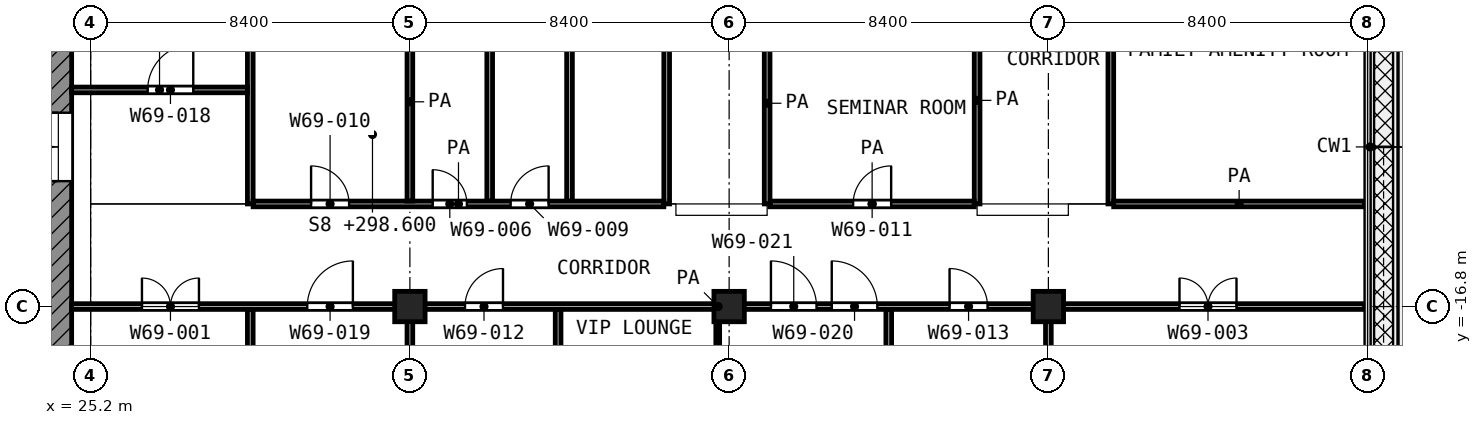
"""IFC4 building model, lengths in metres.
Left out: names, types, materials, properties, quantities, classifications, styles, units other than length and angle.
Written with IfcOpenShell. Run it as: python <this file> out.ifc"""

import sys

from ifc_helpers import new_model, si_unit, direction, frame, frame_2d, origin, origin_2d, place, context, subcontext, project, spatial, rectangle, extrude, element, fill, save


model = new_model("IFC4")
c1 = context("Model", 3, precision=1e-05, world=origin(), true_north=direction((0.0, 1.0)))
c2 = subcontext(c1, "Body", "Model", "MODEL_VIEW")
j1 = project(units=[si_unit("LENGTHUNIT", "METRE"), si_unit("PLANEANGLEUNIT", "RADIAN")], contexts=[c1])
p1 = place(None, origin())
s1 = spatial("IfcSite", under=j1, at=p1, CompositionType="ELEMENT")
p2 = place(p1, origin())
s2 = spatial("IfcBuilding", under=s1, at=p2, CompositionType="ELEMENT")
p3 = place(p2, frame((0.0, 0.0, 298.6)))
s3 = spatial("IfcBuildingStorey", under=s2, at=p3, CompositionType="ELEMENT", Elevation=298.6)
for number, where, z_axis, x_axis in (
    (1, (33.6, -16.8, 0.0), (0.0, 0.0, 1.0), (1.0, 0.0, 0.0)),
    (2, (42.0, -16.8, 0.0), (0.0, 0.0, 1.0), (1.0, 0.0, 0.0)),
    (3, (50.4, -16.8, 0.0), (0.0, 0.0, 1.0), (1.0, 0.0, 0.0)),
):
    element("IfcColumn", number, at=place(p3, frame(where, z_axis=z_axis, x_axis=x_axis)), inside=s3, PredefinedType="COLUMN", context=c2, shape_type="SweptSolid", body=[
        extrude(rectangle(XDim=0.8, YDim=0.8, at=origin_2d()), origin(), (0.0, 0.0, 1.0), 4.2),
    ])
p4 = place(p3, frame((24.35, -24.0, 0.0), z_axis=(0.0, 0.0, 1.0), x_axis=(0.0, 1.0, 0.0)))
e4 = element("IfcWall", 4, at=p4, inside=s3, PredefinedType="SHEAR", context=c2, shape_type="SweptSolid", body=[
    extrude(rectangle(XDim=18.6, YDim=0.7, at=frame_2d((9.3, 0.0))), origin(), (0.0, 0.0, 1.0), 3.6),
])
p5 = place(p4, frame((10.5, 0.0, 0.0)))
e5 = element("IfcOpeningElement", 5, at=p5, cuts=e4, PredefinedType="OPENING", context=c2, shape_type="SweptSolid", body=[
    extrude(rectangle(XDim=1.8, YDim=2.1, at=frame_2d((0.9, 1.05))), frame((0.0, 0.36, 0.0), z_axis=(0.0, -1.0, 0.0), x_axis=(1.0, 0.0, 0.0)), (0.0, 0.0, 1.0), 0.72),
])
p6 = place(p3, frame((41.7, -20.35, 0.0), z_axis=(0.0, 0.0, 1.0), x_axis=(0.0, 1.0, 0.0)))
e6 = element("IfcWall", 6, at=p6, inside=s3, PredefinedType="PARTITIONING", context=c2, shape_type="SweptSolid", body=[
    extrude(rectangle(XDim=3.475, YDim=0.1, at=frame_2d((1.738, 0.0))), origin(), (0.0, 0.0, 1.0), 3.6),
])
p7 = place(p6, frame((1.25, 0.0, 0.0)))
e7 = element("IfcOpeningElement", 7, at=p7, cuts=e6, PredefinedType="OPENING", context=c2, shape_type="SweptSolid", body=[
    extrude(rectangle(XDim=1.0, YDim=2.1, at=frame_2d((0.5, 1.05))), frame((0.0, 0.06, 0.0), z_axis=(0.0, -1.0, 0.0), x_axis=(1.0, 0.0, 0.0)), (0.0, 0.0, 1.0), 0.12),
])
p8 = place(p3, frame((24.7, -16.8, 0.0), z_axis=(0.0, 0.0, 1.0), x_axis=(1.0, 0.0, 0.0)))
e8 = element("IfcWall", 8, at=p8, inside=s3, PredefinedType="PARTITIONING", context=c2, shape_type="SweptSolid", body=[
    extrude(rectangle(XDim=34.02, YDim=0.15, at=frame_2d((17.01, 0.0))), origin(), (0.0, 0.0, 1.0), 3.6),
])
p9 = place(p8, frame((1.85, 0.0, 0.0)))
e9 = element("IfcOpeningElement", 9, at=p9, cuts=e8, PredefinedType="OPENING", context=c2, shape_type="SweptSolid", body=[
    extrude(rectangle(XDim=1.5, YDim=2.1, at=frame_2d((0.75, 1.05))), frame((0.0, 0.085, 0.0), z_axis=(0.0, -1.0, 0.0), x_axis=(1.0, 0.0, 0.0)), (0.0, 0.0, 1.0), 0.17),
])
p10 = place(p8, frame((6.2, 0.0, 0.0)))
e10 = element("IfcOpeningElement", 10, at=p10, cuts=e8, PredefinedType="OPENING", context=c2, shape_type="SweptSolid", body=[
    extrude(rectangle(XDim=1.2, YDim=2.1, at=frame_2d((0.6, 1.05))), frame((0.0, 0.085, 0.0), z_axis=(0.0, -1.0, 0.0), x_axis=(1.0, 0.0, 0.0)), (0.0, 0.0, 1.0), 0.17),
])
p11 = place(p8, frame((10.35, 0.0, 0.0)))
e11 = element("IfcOpeningElement", 11, at=p11, cuts=e8, PredefinedType="OPENING", context=c2, shape_type="SweptSolid", body=[
    extrude(rectangle(XDim=1.0, YDim=2.1, at=frame_2d((0.5, 1.05))), frame((0.0, 0.085, 0.0), z_axis=(0.0, -1.0, 0.0), x_axis=(1.0, 0.0, 0.0)), (0.0, 0.0, 1.0), 0.17),
])
p12 = place(p8, frame((20.0, 0.0, 0.0)))
e12 = element("IfcOpeningElement", 12, at=p12, cuts=e8, PredefinedType="OPENING", context=c2, shape_type="SweptSolid", body=[
    extrude(rectangle(XDim=1.2, YDim=2.1, at=frame_2d((0.6, 1.05))), frame((0.0, 0.085, 0.0), z_axis=(0.0, -1.0, 0.0), x_axis=(1.0, 0.0, 0.0)), (0.0, 0.0, 1.0), 0.17),
])
p13 = place(p8, frame((18.4, 0.0, 0.0)))
e13 = element("IfcOpeningElement", 13, at=p13, cuts=e8, PredefinedType="OPENING", context=c2, shape_type="SweptSolid", body=[
    extrude(rectangle(XDim=1.2, YDim=2.1, at=frame_2d((0.6, 1.05))), frame((0.0, 0.085, 0.0), z_axis=(0.0, -1.0, 0.0), x_axis=(1.0, 0.0, 0.0)), (0.0, 0.0, 1.0), 0.17),
])
p14 = place(p8, frame((23.1, 0.0, 0.0)))
e14 = element("IfcOpeningElement", 14, at=p14, cuts=e8, PredefinedType="OPENING", context=c2, shape_type="SweptSolid", body=[
    extrude(rectangle(XDim=1.0, YDim=2.1, at=frame_2d((0.5, 1.05))), frame((0.0, 0.085, 0.0), z_axis=(0.0, -1.0, 0.0), x_axis=(1.0, 0.0, 0.0)), (0.0, 0.0, 1.0), 0.17),
])
p15 = place(p8, frame((29.15, 0.0, 0.0)))
e15 = element("IfcOpeningElement", 15, at=p15, cuts=e8, PredefinedType="OPENING", context=c2, shape_type="SweptSolid", body=[
    extrude(rectangle(XDim=1.5, YDim=2.1, at=frame_2d((0.75, 1.05))), frame((0.0, 0.085, 0.0), z_axis=(0.0, -1.0, 0.0), x_axis=(1.0, 0.0, 0.0)), (0.0, 0.0, 1.0), 0.17),
])
p16 = place(p3, frame((29.475, -14.1, 0.0), z_axis=(0.0, 0.0, 1.0), x_axis=(1.0, 0.0, 0.0)))
e16 = element("IfcWall", 16, at=p16, inside=s3, PredefinedType="PARTITIONING", context=c2, shape_type="SweptSolid", body=[
    extrude(rectangle(XDim=10.807, YDim=0.15, at=frame_2d((5.403, 0.0))), origin(), (0.0, 0.0, 1.0), 3.6),
])
p17 = place(p16, frame((1.525, 0.0, 0.0)))
e17 = element("IfcOpeningElement", 17, at=p17, cuts=e16, PredefinedType="OPENING", context=c2, shape_type="SweptSolid", body=[
    extrude(rectangle(XDim=1.0, YDim=2.1, at=frame_2d((0.5, 1.05))), frame((0.0, 0.085, 0.0), z_axis=(0.0, -1.0, 0.0), x_axis=(1.0, 0.0, 0.0)), (0.0, 0.0, 1.0), 0.17),
])
p18 = place(p16, frame((4.725, 0.0, 0.0)))
e18 = element("IfcOpeningElement", 18, at=p18, cuts=e16, PredefinedType="OPENING", context=c2, shape_type="SweptSolid", body=[
    extrude(rectangle(XDim=0.9, YDim=2.1, at=frame_2d((0.45, 1.05))), frame((0.0, 0.085, 0.0), z_axis=(0.0, -1.0, 0.0), x_axis=(1.0, 0.0, 0.0)), (0.0, 0.0, 1.0), 0.17),
])
p19 = place(p16, frame((6.775, 0.0, 0.0)))
e19 = element("IfcOpeningElement", 19, at=p19, cuts=e16, PredefinedType="OPENING", context=c2, shape_type="SweptSolid", body=[
    extrude(rectangle(XDim=1.0, YDim=2.1, at=frame_2d((0.5, 1.05))), frame((0.0, 0.085, 0.0), z_axis=(0.0, -1.0, 0.0), x_axis=(1.0, 0.0, 0.0)), (0.0, 0.0, 1.0), 0.17),
])
p20 = place(p3, frame((43.075, -14.1, 0.0), z_axis=(0.0, 0.0, 1.0), x_axis=(1.0, 0.0, 0.0)))
e20 = element("IfcWall", 20, at=p20, inside=s3, PredefinedType="PARTITIONING", context=c2, shape_type="SweptSolid", body=[
    extrude(rectangle(XDim=5.375, YDim=0.15, at=frame_2d((2.688, 0.0))), origin(), (0.0, 0.0, 1.0), 3.6),
])
p21 = place(p20, frame((2.188, 0.0, 0.0)))
e21 = element("IfcOpeningElement", 21, at=p21, cuts=e20, PredefinedType="OPENING", context=c2, shape_type="SweptSolid", body=[
    extrude(rectangle(XDim=1.0, YDim=2.1, at=frame_2d((0.5, 1.05))), frame((0.0, 0.085, 0.0), z_axis=(0.0, -1.0, 0.0), x_axis=(1.0, 0.0, 0.0)), (0.0, 0.0, 1.0), 0.17),
])
p22 = place(p3, frame((52.118, -14.1, 0.0), z_axis=(0.0, 0.0, 1.0), x_axis=(1.0, 0.0, 0.0)))
e22 = element("IfcWall", 22, at=p22, inside=s3, PredefinedType="PARTITIONING", context=c2, shape_type="SweptSolid", body=[
    extrude(rectangle(XDim=6.602, YDim=0.15, at=frame_2d((3.301, 0.0))), origin(), (0.0, 0.0, 1.0), 3.6),
])
p23 = place(p3, frame((24.7, -11.1, 0.0), z_axis=(0.0, 0.0, 1.0), x_axis=(1.0, 0.0, 0.0)))
e23 = element("IfcWall", 23, at=p23, inside=s3, PredefinedType="PARTITIONING", context=c2, shape_type="SweptSolid", body=[
    extrude(rectangle(XDim=4.625, YDim=0.15, at=frame_2d((2.312, 0.0))), origin(), (0.0, 0.0, 1.0), 3.6),
])
p24 = place(p23, frame((2.0, 0.0, 0.0)))
e24 = element("IfcOpeningElement", 24, at=p24, cuts=e23, PredefinedType="OPENING", context=c2, shape_type="SweptSolid", body=[
    extrude(rectangle(XDim=1.2, YDim=2.1, at=frame_2d((0.6, 1.05))), frame((0.0, 0.085, 0.0), z_axis=(0.0, -1.0, 0.0), x_axis=(1.0, 0.0, 0.0)), (0.0, 0.0, 1.0), 0.17),
])
p25 = place(p3, frame((29.4, -31.198, 0.0), z_axis=(0.0, 0.0, 1.0), x_axis=(0.0, 1.0, 0.0)))
e25 = element("IfcWall", 25, at=p25, inside=s3, PredefinedType="PARTITIONING", context=c2, shape_type="SweptSolid", body=[
    extrude(rectangle(XDim=14.323, YDim=0.15, at=frame_2d((7.162, 0.0))), origin(), (0.0, 0.0, 1.0), 3.6),
])
p26 = place(p3, frame((29.4, -14.1, 0.0), z_axis=(0.0, 0.0, 1.0), x_axis=(0.0, 1.0, 0.0)))
e26 = element("IfcWall", 26, at=p26, inside=s3, PredefinedType="PARTITIONING", context=c2, shape_type="SweptSolid", body=[
    extrude(rectangle(XDim=14.02, YDim=0.15, at=frame_2d((7.01, 0.0))), origin(), (0.0, 0.0, 1.0), 3.6),
])
p27 = place(p3, frame((33.6, -28.687, 0.0), z_axis=(0.0, 0.0, 1.0), x_axis=(0.0, 1.0, 0.0)))
e27 = element("IfcWall", 27, at=p27, inside=s3, PredefinedType="PARTITIONING", context=c2, shape_type="SweptSolid", body=[
    extrude(rectangle(XDim=11.812, YDim=0.15, at=frame_2d((5.906, 0.0))), origin(), (0.0, 0.0, 1.0), 3.6),
])
p28 = place(p3, frame((33.6, -14.025, 0.0), z_axis=(0.0, 0.0, 1.0), x_axis=(0.0, 1.0, 0.0)))
e28 = element("IfcWall", 28, at=p28, inside=s3, PredefinedType="PARTITIONING", context=c2, shape_type="SweptSolid", body=[
    extrude(rectangle(XDim=5.225, YDim=0.15, at=frame_2d((2.612, 0.0))), origin(), (0.0, 0.0, 1.0), 3.6),
])
p29 = place(p3, frame((35.7, -14.025, 0.0), z_axis=(0.0, 0.0, 1.0), x_axis=(0.0, 1.0, 0.0)))
e29 = element("IfcWall", 29, at=p29, inside=s3, PredefinedType="PARTITIONING", context=c2, shape_type="SweptSolid", body=[
    extrude(rectangle(XDim=13.945, YDim=0.15, at=frame_2d((6.972, 0.0))), origin(), (0.0, 0.0, 1.0), 3.6),
])
p30 = place(p3, frame((37.5, -25.12, 0.0), z_axis=(0.0, 0.0, 1.0), x_axis=(0.0, 1.0, 0.0)))
e30 = element("IfcWall", 30, at=p30, inside=s3, PredefinedType="PARTITIONING", context=c2, shape_type="SweptSolid", body=[
    extrude(rectangle(XDim=8.245, YDim=0.15, at=frame_2d((4.123, 0.0))), origin(), (0.0, 0.0, 1.0), 3.6),
])
p31 = place(p3, frame((37.8, -14.025, 0.0), z_axis=(0.0, 0.0, 1.0), x_axis=(0.0, 1.0, 0.0)))
e31 = element("IfcWall", 31, at=p31, inside=s3, PredefinedType="PARTITIONING", context=c2, shape_type="SweptSolid", body=[
    extrude(rectangle(XDim=13.945, YDim=0.15, at=frame_2d((6.972, 0.0))), origin(), (0.0, 0.0, 1.0), 3.6),
])
p32 = place(p3, frame((40.357, -14.1, 0.0), z_axis=(0.0, 0.0, 1.0), x_axis=(0.0, 1.0, 0.0)))
e32 = element("IfcWall", 32, at=p32, inside=s3, PredefinedType="PARTITIONING", context=c2, shape_type="SweptSolid", body=[
    extrude(rectangle(XDim=14.02, YDim=0.15, at=frame_2d((7.01, 0.0))), origin(), (0.0, 0.0, 1.0), 3.6),
])
p33 = place(p32, frame((6.375, 0.0, 0.0)))
e33 = element("IfcOpeningElement", 33, at=p33, cuts=e32, PredefinedType="OPENING", context=c2, shape_type="SweptSolid", body=[
    extrude(rectangle(XDim=1.0, YDim=2.1, at=frame_2d((0.5, 1.05))), frame((0.0, 0.085, 0.0), z_axis=(0.0, -1.0, 0.0), x_axis=(1.0, 0.0, 0.0)), (0.0, 0.0, 1.0), 0.17),
])
p34 = place(p3, frame((43.0, -14.1, 0.0), z_axis=(0.0, 0.0, 1.0), x_axis=(0.0, 1.0, 0.0)))
e34 = element("IfcWall", 34, at=p34, inside=s3, PredefinedType="PARTITIONING", context=c2, shape_type="SweptSolid", body=[
    extrude(rectangle(XDim=5.298, YDim=0.15, at=frame_2d((2.649, 0.0))), origin(), (0.0, 0.0, 1.0), 3.6),
])
p35 = place(p3, frame((46.2, -25.12, 0.0), z_axis=(0.0, 0.0, 1.0), x_axis=(0.0, 1.0, 0.0)))
e35 = element("IfcWall", 35, at=p35, inside=s3, PredefinedType="PARTITIONING", context=c2, shape_type="SweptSolid", body=[
    extrude(rectangle(XDim=8.245, YDim=0.15, at=frame_2d((4.123, 0.0))), origin(), (0.0, 0.0, 1.0), 3.6),
])
p36 = place(p3, frame((48.525, -14.1, 0.0), z_axis=(0.0, 0.0, 1.0), x_axis=(0.0, 1.0, 0.0)))
e36 = element("IfcWall", 36, at=p36, inside=s3, PredefinedType="PARTITIONING", context=c2, shape_type="SweptSolid", body=[
    extrude(rectangle(XDim=5.45, YDim=0.15, at=frame_2d((2.725, 0.0))), origin(), (0.0, 0.0, 1.0), 3.6),
])
p37 = place(p3, frame((50.4, -25.12, 0.0), z_axis=(0.0, 0.0, 1.0), x_axis=(0.0, 1.0, 0.0)))
e37 = element("IfcWall", 37, at=p37, inside=s3, PredefinedType="PARTITIONING", context=c2, shape_type="SweptSolid", body=[
    extrude(rectangle(XDim=8.245, YDim=0.15, at=frame_2d((4.123, 0.0))), origin(), (0.0, 0.0, 1.0), 3.6),
])
p38 = place(p3, frame((52.043, -14.1, 0.0), z_axis=(0.0, 0.0, 1.0), x_axis=(0.0, 1.0, 0.0)))
e38 = element("IfcWall", 38, at=p38, inside=s3, PredefinedType="PARTITIONING", context=c2, shape_type="SweptSolid", body=[
    extrude(rectangle(XDim=12.248, YDim=0.15, at=frame_2d((6.124, 0.0))), origin(), (0.0, 0.0, 1.0), 3.6),
])
p39 = place(p38, frame((6.074, 0.0, 0.0)))
e39 = element("IfcOpeningElement", 39, at=p39, cuts=e38, PredefinedType="OPENING", context=c2, shape_type="SweptSolid", body=[
    extrude(rectangle(XDim=1.5, YDim=2.1, at=frame_2d((0.75, 1.05))), frame((0.0, 0.085, 0.0), z_axis=(0.0, -1.0, 0.0), x_axis=(1.0, 0.0, 0.0)), (0.0, 0.0, 1.0), 0.17),
])
p40 = place(p5, origin())
e40 = element("IfcDoor", 40, at=p40, inside=s3, OperationType="DOUBLE_DOOR_SINGLE_SWING", PredefinedType="DOOR", context=c2, shape_type="SweptSolid", body=[
    extrude(rectangle(XDim=1.8, YDim=2.1, at=frame_2d((0.9, 1.05))), frame((0.0, 0.025, 0.0), z_axis=(0.0, -1.0, 0.0), x_axis=(1.0, 0.0, 0.0)), (0.0, 0.0, 1.0), 0.05),
])
fill(e5, e40)
p41 = place(p9, origin())
e41 = element("IfcDoor", 41, at=p41, inside=s3, OperationType="DOUBLE_DOOR_SINGLE_SWING", PredefinedType="DOOR", context=c2, shape_type="SweptSolid", body=[
    extrude(rectangle(XDim=1.5, YDim=2.1, at=frame_2d((0.75, 1.05))), frame((0.0, 0.025, 0.0), z_axis=(0.0, -1.0, 0.0), x_axis=(1.0, 0.0, 0.0)), (0.0, 0.0, 1.0), 0.05),
])
fill(e9, e41)
p42 = place(p24, origin())
e42 = element("IfcDoor", 42, at=p42, inside=s3, OperationType="SINGLE_SWING_RIGHT", PredefinedType="DOOR", context=c2, shape_type="SweptSolid", body=[
    extrude(rectangle(XDim=1.2, YDim=2.1, at=frame_2d((0.6, 1.05))), frame((0.0, 0.025, 0.0), z_axis=(0.0, -1.0, 0.0), x_axis=(1.0, 0.0, 0.0)), (0.0, 0.0, 1.0), 0.05),
])
fill(e24, e42)
p43 = place(p17, origin())
e43 = element("IfcDoor", 43, at=p43, inside=s3, OperationType="SINGLE_SWING_LEFT", PredefinedType="DOOR", context=c2, shape_type="SweptSolid", body=[
    extrude(rectangle(XDim=1.0, YDim=2.1, at=frame_2d((0.5, 1.05))), frame((0.0, 0.025, 0.0), z_axis=(0.0, -1.0, 0.0), x_axis=(1.0, 0.0, 0.0)), (0.0, 0.0, 1.0), 0.05),
])
fill(e17, e43)
p44 = place(p21, origin())
e44 = element("IfcDoor", 44, at=p44, inside=s3, OperationType="SINGLE_SWING_RIGHT", PredefinedType="DOOR", context=c2, shape_type="SweptSolid", body=[
    extrude(rectangle(XDim=1.0, YDim=2.1, at=frame_2d((0.5, 1.05))), frame((0.0, 0.025, 0.0), z_axis=(0.0, -1.0, 0.0), x_axis=(1.0, 0.0, 0.0)), (0.0, 0.0, 1.0), 0.05),
])
fill(e21, e44)
p45 = place(p10, origin())
e45 = element("IfcDoor", 45, at=p45, inside=s3, OperationType="SINGLE_SWING_RIGHT", PredefinedType="DOOR", context=c2, shape_type="SweptSolid", body=[
    extrude(rectangle(XDim=1.2, YDim=2.1, at=frame_2d((0.6, 1.05))), frame((0.0, 0.025, 0.0), z_axis=(0.0, -1.0, 0.0), x_axis=(1.0, 0.0, 0.0)), (0.0, 0.0, 1.0), 0.05),
])
fill(e10, e45)
p46 = place(p11, origin())
e46 = element("IfcDoor", 46, at=p46, inside=s3, OperationType="SINGLE_SWING_RIGHT", PredefinedType="DOOR", context=c2, shape_type="SweptSolid", body=[
    extrude(rectangle(XDim=1.0, YDim=2.1, at=frame_2d((0.5, 1.05))), frame((0.0, 0.025, 0.0), z_axis=(0.0, -1.0, 0.0), x_axis=(1.0, 0.0, 0.0)), (0.0, 0.0, 1.0), 0.05),
])
fill(e11, e46)
p47 = place(p12, origin())
e47 = element("IfcDoor", 47, at=p47, inside=s3, OperationType="SINGLE_SWING_LEFT", PredefinedType="DOOR", context=c2, shape_type="SweptSolid", body=[
    extrude(rectangle(XDim=1.2, YDim=2.1, at=frame_2d((0.6, 1.05))), frame((0.0, 0.025, 0.0), z_axis=(0.0, -1.0, 0.0), x_axis=(1.0, 0.0, 0.0)), (0.0, 0.0, 1.0), 0.05),
])
fill(e12, e47)
p48 = place(p13, origin())
e48 = element("IfcDoor", 48, at=p48, inside=s3, OperationType="SINGLE_SWING_LEFT", PredefinedType="DOOR", context=c2, shape_type="SweptSolid", body=[
    extrude(rectangle(XDim=1.2, YDim=2.1, at=frame_2d((0.6, 1.05))), frame((0.0, 0.025, 0.0), z_axis=(0.0, -1.0, 0.0), x_axis=(1.0, 0.0, 0.0)), (0.0, 0.0, 1.0), 0.05),
])
fill(e13, e48)
p49 = place(p14, origin())
e49 = element("IfcDoor", 49, at=p49, inside=s3, OperationType="SINGLE_SWING_LEFT", PredefinedType="DOOR", context=c2, shape_type="SweptSolid", body=[
    extrude(rectangle(XDim=1.0, YDim=2.1, at=frame_2d((0.5, 1.05))), frame((0.0, 0.025, 0.0), z_axis=(0.0, -1.0, 0.0), x_axis=(1.0, 0.0, 0.0)), (0.0, 0.0, 1.0), 0.05),
])
fill(e14, e49)
p50 = place(p15, origin())
e50 = element("IfcDoor", 50, at=p50, inside=s3, OperationType="DOUBLE_DOOR_SINGLE_SWING", PredefinedType="DOOR", context=c2, shape_type="SweptSolid", body=[
    extrude(rectangle(XDim=1.5, YDim=2.1, at=frame_2d((0.75, 1.05))), frame((0.0, 0.025, 0.0), z_axis=(0.0, -1.0, 0.0), x_axis=(1.0, 0.0, 0.0)), (0.0, 0.0, 1.0), 0.05),
])
fill(e15, e50)
p51 = place(p18, origin())
e51 = element("IfcDoor", 51, at=p51, inside=s3, OperationType="SINGLE_SWING_LEFT", PredefinedType="DOOR", context=c2, shape_type="SweptSolid", body=[
    extrude(rectangle(XDim=0.9, YDim=2.1, at=frame_2d((0.45, 1.05))), frame((0.0, 0.025, 0.0), z_axis=(0.0, -1.0, 0.0), x_axis=(1.0, 0.0, 0.0)), (0.0, 0.0, 1.0), 0.05),
])
fill(e18, e51)
p52 = place(p19, origin())
e52 = element("IfcDoor", 52, at=p52, inside=s3, OperationType="SINGLE_SWING_RIGHT", PredefinedType="DOOR", context=c2, shape_type="SweptSolid", body=[
    extrude(rectangle(XDim=1.0, YDim=2.1, at=frame_2d((0.5, 1.05))), frame((0.0, 0.025, 0.0), z_axis=(0.0, -1.0, 0.0), x_axis=(1.0, 0.0, 0.0)), (0.0, 0.0, 1.0), 0.05),
])
fill(e19, e52)
save(model, sys.argv[1])
